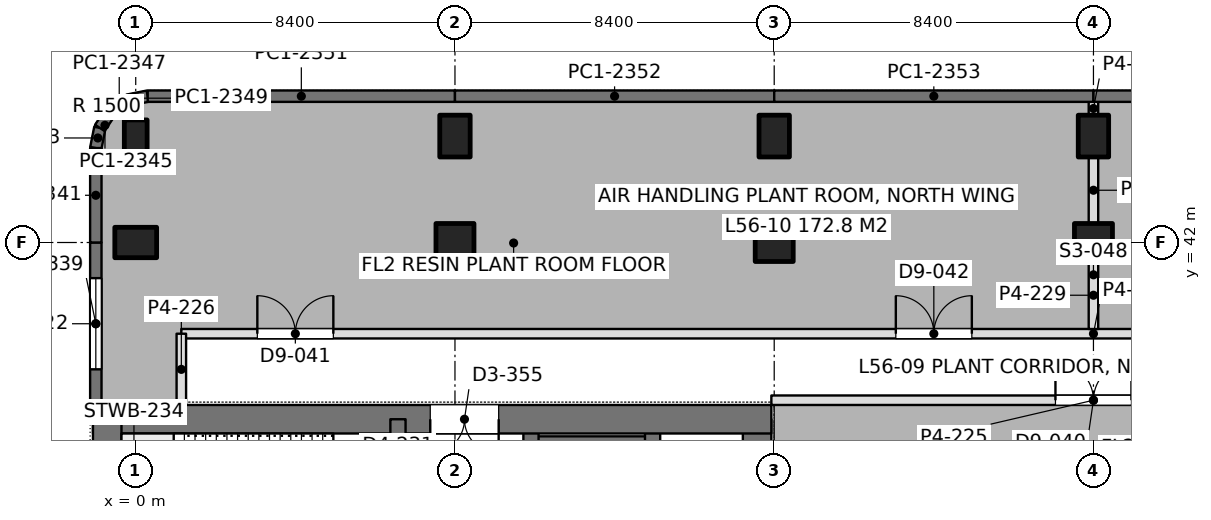
"""IFC4 building model, lengths in metres.
Left out: names, types, materials, properties, quantities, classifications, styles, units other than length and angle.
Written with IfcOpenShell. Run it as: python <this file> out.ifc"""

import sys

from ifc_helpers import new_model, si_unit, direction, frame, frame_2d, origin, origin_2d, place, context, subcontext, project, spatial, rectangle, extrude, element, fill, save


model = new_model("IFC4")
c1 = context("Model", 3, precision=1e-05, world=origin(), true_north=direction((0.0, 1.0)))
c2 = subcontext(c1, "Body", "Model", "MODEL_VIEW")
j1 = project(units=[si_unit("LENGTHUNIT", "METRE"), si_unit("PLANEANGLEUNIT", "RADIAN")], contexts=[c1])
p1 = place(None, origin())
s1 = spatial("IfcSite", under=j1, at=p1, CompositionType="ELEMENT")
p2 = place(p1, origin())
s2 = spatial("IfcBuilding", under=s1, at=p2, CompositionType="ELEMENT")
p3 = place(p2, frame((0.0, 0.0, 244.8)))
s3 = spatial("IfcBuildingStorey", under=s2, at=p3, CompositionType="ELEMENT", Elevation=244.8)
p4 = place(p3, frame((0.0, 42.0, 0.0), z_axis=(0.0, 0.0, 1.0), x_axis=(0.0, 1.0, 0.0)))
e1 = element("IfcColumn", 1, at=p4, inside=s3, PredefinedType="COLUMN", context=c2, shape_type="SweptSolid", body=[
    extrude(rectangle(XDim=0.8, YDim=1.1, at=origin_2d()), origin(), (0.0, 0.0, 1.0), 5.4),
])
p5 = place(p3, frame((0.0, 44.8, 0.0), z_axis=(0.0, 0.0, 1.0), x_axis=(1.0, 0.0, 0.0)))
e2 = element("IfcColumn", 2, at=p5, inside=s3, PredefinedType="COLUMN", context=c2, shape_type="SweptSolid", body=[
    extrude(rectangle(XDim=0.6, YDim=0.85, at=origin_2d()), origin(), (0.0, 0.0, 1.0), 5.4),
])
p6 = place(p3, frame((8.4, 42.0, 0.0), z_axis=(0.0, 0.0, 1.0), x_axis=(1.0, 0.0, 0.0)))
e3 = element("IfcColumn", 3, at=p6, inside=s3, PredefinedType="COLUMN", context=c2, shape_type="SweptSolid", body=[
    extrude(rectangle(XDim=1.0, YDim=1.0, at=origin_2d()), origin(), (0.0, 0.0, 1.0), 5.4),
])
p7 = place(p3, frame((8.4, 44.8, 0.0), z_axis=(0.0, 0.0, 1.0), x_axis=(1.0, 0.0, 0.0)))
e4 = element("IfcColumn", 4, at=p7, inside=s3, PredefinedType="COLUMN", context=c2, shape_type="SweptSolid", body=[
    extrude(rectangle(XDim=0.8, YDim=1.1, at=origin_2d()), origin(), (0.0, 0.0, 1.0), 5.4),
])
p8 = place(p3, frame((16.8, 42.0, 0.0), z_axis=(0.0, 0.0, 1.0), x_axis=(1.0, 0.0, 0.0)))
e5 = element("IfcColumn", 5, at=p8, inside=s3, PredefinedType="COLUMN", context=c2, shape_type="SweptSolid", body=[
    extrude(rectangle(XDim=1.0, YDim=1.0, at=origin_2d()), origin(), (0.0, 0.0, 1.0), 5.4),
])
p9 = place(p3, frame((16.8, 44.8, 0.0), z_axis=(0.0, 0.0, 1.0), x_axis=(1.0, 0.0, 0.0)))
e6 = element("IfcColumn", 6, at=p9, inside=s3, PredefinedType="COLUMN", context=c2, shape_type="SweptSolid", body=[
    extrude(rectangle(XDim=0.8, YDim=1.1, at=origin_2d()), origin(), (0.0, 0.0, 1.0), 5.4),
])
p10 = place(p3, frame((25.2, 42.0, 0.0), z_axis=(0.0, 0.0, 1.0), x_axis=(1.0, 0.0, 0.0)))
e7 = element("IfcColumn", 7, at=p10, inside=s3, PredefinedType="COLUMN", context=c2, shape_type="SweptSolid", body=[
    extrude(rectangle(XDim=1.0, YDim=1.0, at=origin_2d()), origin(), (0.0, 0.0, 1.0), 5.4),
])
p11 = place(p3, frame((25.2, 44.8, 0.0), z_axis=(0.0, 0.0, 1.0), x_axis=(1.0, 0.0, 0.0)))
e8 = element("IfcColumn", 8, at=p11, inside=s3, PredefinedType="COLUMN", context=c2, shape_type="SweptSolid", body=[
    extrude(rectangle(XDim=0.8, YDim=1.1, at=origin_2d()), origin(), (0.0, 0.0, 1.0), 5.4),
])
p12 = place(p3, frame((-1.125, 37.35, 0.0), z_axis=(0.0, 0.0, 1.0), x_axis=(1.0, 0.0, 0.0)))
e9 = element("IfcWall", 9, at=p12, inside=s3, PredefinedType="SHEAR", context=c2, shape_type="SweptSolid", body=[
    extrude(rectangle(XDim=17.85, YDim=0.75, at=frame_2d((8.925, 0.0))), origin(), (0.0, 0.0, 1.0), 5.4),
])
p13 = place(p12, frame((8.875, 0.0, 0.0)))
e10 = element("IfcOpeningElement", 10, at=p13, cuts=e9, PredefinedType="OPENING", context=c2, shape_type="SweptSolid", body=[
    extrude(rectangle(XDim=1.8, YDim=2.4, at=frame_2d((0.9, 1.2))), frame((0.0, 0.385, 0.0), z_axis=(0.0, -1.0, 0.0), x_axis=(1.0, 0.0, 0.0)), (0.0, 0.0, 1.0), 0.77),
])
p14 = place(p3, frame((-0.75, 13.05, 0.0), z_axis=(0.0, 0.0, 1.0), x_axis=(0.0, 1.0, 0.0)))
e11 = element("IfcWall", 11, at=p14, inside=s3, PredefinedType="SHEAR", context=c2, shape_type="SweptSolid", body=[
    extrude(rectangle(XDim=24.3, YDim=0.75, at=frame_2d((12.15, 0.0))), origin(), (0.0, 0.0, 1.0), 5.4),
])
p15 = place(p3, frame((16.35, 27.8, 0.0), z_axis=(0.0, 0.0, 1.0), x_axis=(0.0, 1.0, 0.0)))
e12 = element("IfcWall", 12, at=p15, inside=s3, PredefinedType="SHEAR", context=c2, shape_type="SweptSolid", body=[
    extrude(rectangle(XDim=9.55, YDim=0.75, at=frame_2d((4.775, 0.0))), origin(), (0.0, 0.0, 1.0), 5.4),
])
p16 = place(p3, frame((6.9, 13.05, 0.0), z_axis=(0.0, 0.0, 1.0), x_axis=(0.0, 1.0, 0.0)))
e13 = element("IfcWall", 13, at=p16, inside=s3, PredefinedType="SHEAR", context=c2, shape_type="SweptSolid", body=[
    extrude(rectangle(XDim=24.3, YDim=0.4, at=frame_2d((12.15, 0.0))), origin(), (0.0, 0.0, 1.0), 5.4),
])
p17 = place(p16, frame((1.3, 0.0, 0.0)))
e14 = element("IfcOpeningElement", 14, at=p17, cuts=e13, PredefinedType="OPENING", context=c2, shape_type="SweptSolid", body=[
    extrude(rectangle(XDim=1.0, YDim=2.2, at=frame_2d((0.5, 1.1))), frame((0.0, 0.21, 0.0), z_axis=(0.0, -1.0, 0.0), x_axis=(1.0, 0.0, 0.0)), (0.0, 0.0, 1.0), 0.42),
])
p18 = place(p16, frame((22.0, 0.0, 0.0)))
e15 = element("IfcOpeningElement", 15, at=p18, cuts=e13, PredefinedType="OPENING", context=c2, shape_type="SweptSolid", body=[
    extrude(rectangle(XDim=1.0, YDim=2.2, at=frame_2d((0.5, 1.1))), frame((0.0, 0.21, 0.0), z_axis=(0.0, -1.0, 0.0), x_axis=(1.0, 0.0, 0.0)), (0.0, 0.0, 1.0), 0.42),
])
p19 = place(p16, frame((5.55, 0.0, 0.0)))
e16 = element("IfcOpeningElement", 16, at=p19, cuts=e13, PredefinedType="OPENING", context=c2, shape_type="SweptSolid", body=[
    extrude(rectangle(XDim=1.0, YDim=2.2, at=frame_2d((0.5, 1.1))), frame((0.0, 0.21, 0.0), z_axis=(0.0, -1.0, 0.0), x_axis=(1.0, 0.0, 0.0)), (0.0, 0.0, 1.0), 0.42),
])
p20 = place(p16, frame((9.55, 0.0, 0.0)))
e17 = element("IfcOpeningElement", 17, at=p20, cuts=e13, PredefinedType="OPENING", context=c2, shape_type="SweptSolid", body=[
    extrude(rectangle(XDim=1.0, YDim=2.2, at=frame_2d((0.5, 1.1))), frame((0.0, 0.21, 0.0), z_axis=(0.0, -1.0, 0.0), x_axis=(1.0, 0.0, 0.0)), (0.0, 0.0, 1.0), 0.42),
])
p21 = place(p16, frame((12.8, 0.0, 0.0)))
e18 = element("IfcOpeningElement", 18, at=p21, cuts=e13, PredefinedType="OPENING", context=c2, shape_type="SweptSolid", body=[
    extrude(rectangle(XDim=1.1, YDim=2.2, at=frame_2d((0.55, 1.1))), frame((0.0, 0.21, 0.0), z_axis=(0.0, -1.0, 0.0), x_axis=(1.0, 0.0, 0.0)), (0.0, 0.0, 1.0), 0.42),
])
p22 = place(p16, frame((15.538, 0.0, 0.0)))
e19 = element("IfcOpeningElement", 19, at=p22, cuts=e13, PredefinedType="OPENING", context=c2, shape_type="SweptSolid", body=[
    extrude(rectangle(XDim=1.1, YDim=2.2, at=frame_2d((0.55, 1.1))), frame((0.0, 0.21, 0.0), z_axis=(0.0, -1.0, 0.0), x_axis=(1.0, 0.0, 0.0)), (0.0, 0.0, 1.0), 0.42),
])
p23 = place(p16, frame((18.262, 0.0, 0.0)))
e20 = element("IfcOpeningElement", 20, at=p23, cuts=e13, PredefinedType="OPENING", context=c2, shape_type="SweptSolid", body=[
    extrude(rectangle(XDim=1.1, YDim=2.2, at=frame_2d((0.55, 1.1))), frame((0.0, 0.21, 0.0), z_axis=(0.0, -1.0, 0.0), x_axis=(1.0, 0.0, 0.0)), (0.0, 0.0, 1.0), 0.42),
])
p24 = place(p3, frame((10.4, 13.05, 0.0), z_axis=(0.0, 0.0, 1.0), x_axis=(0.0, 1.0, 0.0)))
e21 = element("IfcWall", 21, at=p24, inside=s3, PredefinedType="SHEAR", context=c2, shape_type="SweptSolid", body=[
    extrude(rectangle(XDim=24.3, YDim=0.4, at=frame_2d((12.15, 0.0))), origin(), (0.0, 0.0, 1.0), 5.4),
])
p25 = place(p24, frame((15.75, 0.0, 0.0)))
e22 = element("IfcOpeningElement", 22, at=p25, cuts=e21, PredefinedType="OPENING", context=c2, shape_type="SweptSolid", body=[
    extrude(rectangle(XDim=1.1, YDim=2.2, at=frame_2d((0.55, 1.1))), frame((0.0, 0.21, 0.0), z_axis=(0.0, -1.0, 0.0), x_axis=(1.0, 0.0, 0.0)), (0.0, 0.0, 1.0), 0.42),
])
p26 = place(p24, frame((18.6, 0.0, 0.0)))
e23 = element("IfcOpeningElement", 23, at=p26, cuts=e21, PredefinedType="OPENING", context=c2, shape_type="SweptSolid", body=[
    extrude(rectangle(XDim=1.1, YDim=2.2, at=frame_2d((0.55, 1.1))), frame((0.0, 0.21, 0.0), z_axis=(0.0, -1.0, 0.0), x_axis=(1.0, 0.0, 0.0)), (0.0, 0.0, 1.0), 0.42),
])
p27 = place(p24, frame((21.45, 0.0, 0.0)))
e24 = element("IfcOpeningElement", 24, at=p27, cuts=e21, PredefinedType="OPENING", context=c2, shape_type="SweptSolid", body=[
    extrude(rectangle(XDim=1.1, YDim=2.2, at=frame_2d((0.55, 1.1))), frame((0.0, 0.21, 0.0), z_axis=(0.0, -1.0, 0.0), x_axis=(1.0, 0.0, 0.0)), (0.0, 0.0, 1.0), 0.42),
])
p28 = place(p24, frame((8.65, 0.0, 0.0)))
e25 = element("IfcOpeningElement", 25, at=p28, cuts=e21, PredefinedType="OPENING", context=c2, shape_type="SweptSolid", body=[
    extrude(rectangle(XDim=1.8, YDim=2.4, at=frame_2d((0.9, 1.2))), frame((0.0, 0.21, 0.0), z_axis=(0.0, -1.0, 0.0), x_axis=(1.0, 0.0, 0.0)), (0.0, 0.0, 1.0), 0.42),
])
p29 = place(p24, frame((1.05, 0.0, 0.0)))
e26 = element("IfcOpeningElement", 26, at=p29, cuts=e21, PredefinedType="OPENING", context=c2, shape_type="SweptSolid", body=[
    extrude(rectangle(XDim=1.8, YDim=2.4, at=frame_2d((0.9, 1.2))), frame((0.0, 0.21, 0.0), z_axis=(0.0, -1.0, 0.0), x_axis=(1.0, 0.0, 0.0)), (0.0, 0.0, 1.0), 0.42),
])
p30 = place(p3, frame((13.6, 27.925, 0.0), z_axis=(0.0, 0.0, 1.0), x_axis=(0.0, 1.0, 0.0)))
e27 = element("IfcWall", 27, at=p30, inside=s3, PredefinedType="SHEAR", context=c2, shape_type="SweptSolid", body=[
    extrude(rectangle(XDim=9.425, YDim=0.4, at=frame_2d((4.712, 0.0))), origin(), (0.0, 0.0, 1.0), 5.4),
])
p31 = place(p3, frame((10.4, 36.625, 0.0), z_axis=(0.0, 0.0, 1.0), x_axis=(1.0, 0.0, 0.0)))
e28 = element("IfcWall", 28, at=p31, inside=s3, PredefinedType="SHEAR", context=c2, shape_type="SweptSolid", body=[
    extrude(rectangle(XDim=3.2, YDim=0.55, at=frame_2d((1.6, 0.0))), origin(), (0.0, 0.0, 1.0), 5.4),
])
p32 = place(p3, frame((-1.05, 37.725, 0.0), z_axis=(0.0, 0.0, 1.0), x_axis=(0.0, 1.0, 0.0)))
e29 = element("IfcWall", 29, at=p32, inside=s3, PredefinedType="SOLIDWALL", context=c2, shape_type="SweptSolid", body=[
    extrude(rectangle(XDim=4.275, YDim=0.3, at=frame_2d((2.137, 0.0))), origin(), (0.0, 0.0, 1.0), 5.25),
])
p33 = place(p32, frame((0.938, 0.0, 1.2)))
e30 = element("IfcOpeningElement", 30, at=p33, cuts=e29, PredefinedType="OPENING", context=c2, shape_type="SweptSolid", body=[
    extrude(rectangle(XDim=2.4, YDim=2.4, at=frame_2d((1.2, 1.2))), frame((0.0, 0.16, 0.0), z_axis=(0.0, -1.0, 0.0), x_axis=(1.0, 0.0, 0.0)), (0.0, 0.0, 1.0), 0.32),
])
p34 = place(p3, frame((-1.05, 42.0, 0.0), z_axis=(0.0, 0.0, 1.0), x_axis=(0.0, 1.0, 0.0)))
e31 = element("IfcWall", 31, at=p34, inside=s3, PredefinedType="SOLIDWALL", context=c2, shape_type="SweptSolid", body=[
    extrude(rectangle(XDim=2.485, YDim=0.3, at=frame_2d((1.243, 0.0))), origin(), (0.0, 0.0, 1.0), 5.25),
])
p35 = place(p3, frame((-1.05, 44.485, 0.0), z_axis=(0.0, 0.0, 1.0), x_axis=(0.195073962632, 0.980788534345, 0.0)))
e32 = element("IfcWall", 32, at=p35, inside=s3, PredefinedType="SOLIDWALL", context=c2, shape_type="SweptSolid", body=[
    extrude(rectangle(XDim=0.541, YDim=0.3, at=frame_2d((0.271, 0.0))), origin(), (0.0, 0.0, 1.0), 5.25),
])
p36 = place(p3, frame((-0.945, 45.015, 0.0), z_axis=(0.0, 0.0, 1.0), x_axis=(0.55534295404, 0.831621430339, 0.0)))
e33 = element("IfcWall", 33, at=p36, inside=s3, PredefinedType="SOLIDWALL", context=c2, shape_type="SweptSolid", body=[
    extrude(rectangle(XDim=0.526, YDim=0.3, at=frame_2d((0.263, 0.0))), origin(), (0.0, 0.0, 1.0), 5.25),
])
p37 = place(p3, frame((-0.653, 45.453, 0.0), z_axis=(0.0, 0.0, 1.0), x_axis=(0.831692711774, 0.555236195849, 0.0)))
e34 = element("IfcWall", 34, at=p37, inside=s3, PredefinedType="SOLIDWALL", context=c2, shape_type="SweptSolid", body=[
    extrude(rectangle(XDim=0.525, YDim=0.3, at=frame_2d((0.263, 0.0))), origin(), (0.0, 0.0, 1.0), 5.25),
])
p38 = place(p3, frame((-0.216, 45.744, 0.0), z_axis=(0.0, 0.0, 1.0), x_axis=(0.980702050465, 0.1955082817, 0.0)))
e35 = element("IfcWall", 35, at=p38, inside=s3, PredefinedType="SOLIDWALL", context=c2, shape_type="SweptSolid", body=[
    extrude(rectangle(XDim=0.541, YDim=0.3, at=frame_2d((0.271, 0.0))), origin(), (0.0, 0.0, 1.0), 5.25),
])
p39 = place(p3, frame((0.315, 45.85, 0.0), z_axis=(0.0, 0.0, 1.0), x_axis=(1.0, 0.0, 0.0)))
e36 = element("IfcWall", 36, at=p39, inside=s3, PredefinedType="SOLIDWALL", context=c2, shape_type="SweptSolid", body=[
    extrude(rectangle(XDim=8.085, YDim=0.3, at=frame_2d((4.042, 0.0))), origin(), (0.0, 0.0, 1.0), 5.25),
])
p40 = place(p3, frame((8.4, 45.85, 0.0), z_axis=(0.0, 0.0, 1.0), x_axis=(1.0, 0.0, 0.0)))
e37 = element("IfcWall", 37, at=p40, inside=s3, PredefinedType="SOLIDWALL", context=c2, shape_type="SweptSolid", body=[
    extrude(rectangle(XDim=8.4, YDim=0.3, at=frame_2d((4.2, 0.0))), origin(), (0.0, 0.0, 1.0), 5.25),
])
p41 = place(p3, frame((16.8, 45.85, 0.0), z_axis=(0.0, 0.0, 1.0), x_axis=(1.0, 0.0, 0.0)))
e38 = element("IfcWall", 38, at=p41, inside=s3, PredefinedType="SOLIDWALL", context=c2, shape_type="SweptSolid", body=[
    extrude(rectangle(XDim=8.4, YDim=0.3, at=frame_2d((4.2, 0.0))), origin(), (0.0, 0.0, 1.0), 5.25),
])
p42 = place(p3, frame((25.2, 45.85, 0.0), z_axis=(0.0, 0.0, 1.0), x_axis=(1.0, 0.0, 0.0)))
e39 = element("IfcWall", 39, at=p42, inside=s3, PredefinedType="SOLIDWALL", context=c2, shape_type="SweptSolid", body=[
    extrude(rectangle(XDim=8.4, YDim=0.3, at=frame_2d((4.2, 0.0))), origin(), (0.0, 0.0, 1.0), 5.25),
])
p43 = place(p3, frame((1.2, 39.6, 0.0), z_axis=(0.0, 0.0, 1.0), x_axis=(1.0, 0.0, 0.0)))
e40 = element("IfcWall", 40, at=p43, inside=s3, PredefinedType="PARTITIONING", context=c2, shape_type="SweptSolid", body=[
    extrude(rectangle(XDim=48.0, YDim=0.25, at=frame_2d((24.0, 0.0))), origin(), (0.0, 0.0, 1.0), 4.7),
])
p44 = place(p43, frame((2.0, 0.0, 0.0)))
e41 = element("IfcOpeningElement", 41, at=p44, cuts=e40, PredefinedType="OPENING", context=c2, shape_type="SweptSolid", body=[
    extrude(rectangle(XDim=2.0, YDim=2.4, at=frame_2d((1.0, 1.2))), frame((0.0, 0.135, 0.0), z_axis=(0.0, -1.0, 0.0), x_axis=(1.0, 0.0, 0.0)), (0.0, 0.0, 1.0), 0.27),
])
p45 = place(p43, frame((18.8, 0.0, 0.0)))
e42 = element("IfcOpeningElement", 42, at=p45, cuts=e40, PredefinedType="OPENING", context=c2, shape_type="SweptSolid", body=[
    extrude(rectangle(XDim=2.0, YDim=2.4, at=frame_2d((1.0, 1.2))), frame((0.0, 0.135, 0.0), z_axis=(0.0, -1.0, 0.0), x_axis=(1.0, 0.0, 0.0)), (0.0, 0.0, 1.0), 0.27),
])
p46 = place(p43, frame((27.2, 0.0, 0.0)))
e43 = element("IfcOpeningElement", 43, at=p46, cuts=e40, PredefinedType="OPENING", context=c2, shape_type="SweptSolid", body=[
    extrude(rectangle(XDim=2.0, YDim=2.4, at=frame_2d((1.0, 1.2))), frame((0.0, 0.135, 0.0), z_axis=(0.0, -1.0, 0.0), x_axis=(1.0, 0.0, 0.0)), (0.0, 0.0, 1.0), 0.27),
])
p47 = place(p43, frame((44.0, 0.0, 0.0)))
e44 = element("IfcOpeningElement", 44, at=p47, cuts=e40, PredefinedType="OPENING", context=c2, shape_type="SweptSolid", body=[
    extrude(rectangle(XDim=2.0, YDim=2.4, at=frame_2d((1.0, 1.2))), frame((0.0, 0.135, 0.0), z_axis=(0.0, -1.0, 0.0), x_axis=(1.0, 0.0, 0.0)), (0.0, 0.0, 1.0), 0.27),
])
p48 = place(p3, frame((1.2, 37.724, 0.0), z_axis=(0.0, 0.0, 1.0), x_axis=(0.0, 1.0, 0.0)))
e45 = element("IfcWall", 45, at=p48, inside=s3, PredefinedType="PARTITIONING", context=c2, shape_type="SweptSolid", body=[
    extrude(rectangle(XDim=1.876, YDim=0.25, at=frame_2d((0.938, 0.0))), origin(), (0.0, 0.0, 1.0), 5.25),
])
p49 = place(p3, frame((25.2, 39.724, 0.0), z_axis=(0.0, 0.0, 1.0), x_axis=(0.0, 1.0, 0.0)))
e46 = element("IfcWall", 46, at=p49, inside=s3, PredefinedType="PARTITIONING", context=c2, shape_type="SweptSolid", body=[
    extrude(rectangle(XDim=1.777, YDim=0.25, at=frame_2d((0.888, 0.0))), origin(), (0.0, 0.0, 1.0), 4.7),
])
p50 = place(p3, frame((25.2, 42.499, 0.0), z_axis=(0.0, 0.0, 1.0), x_axis=(0.0, 1.0, 0.0)))
e47 = element("IfcWall", 47, at=p50, inside=s3, PredefinedType="PARTITIONING", context=c2, shape_type="SweptSolid", body=[
    extrude(rectangle(XDim=1.752, YDim=0.25, at=frame_2d((0.876, 0.0))), origin(), (0.0, 0.0, 1.0), 4.89),
])
p51 = place(p3, frame((25.2, 45.351, 0.0), z_axis=(0.0, 0.0, 1.0), x_axis=(0.0, 1.0, 0.0)))
e48 = element("IfcWall", 48, at=p51, inside=s3, PredefinedType="PARTITIONING", context=c2, shape_type="SweptSolid", body=[
    extrude(rectangle(XDim=0.351, YDim=0.25, at=frame_2d((0.175, 0.0))), origin(), (0.0, 0.0, 1.0), 5.25),
])
p52 = place(p3, frame((16.725, 37.85, 0.0), z_axis=(0.0, 0.0, 1.0), x_axis=(1.0, 0.0, 0.0)))
e49 = element("IfcWall", 49, at=p52, inside=s3, PredefinedType="PARTITIONING", context=c2, shape_type="SweptSolid", body=[
    extrude(rectangle(XDim=16.95, YDim=0.25, at=frame_2d((8.475, 0.0))), origin(), (0.0, 0.0, 1.0), 4.7),
])
p53 = place(p52, frame((7.475, 0.0, 0.0)))
e50 = element("IfcOpeningElement", 50, at=p53, cuts=e49, PredefinedType="OPENING", context=c2, shape_type="SweptSolid", body=[
    extrude(rectangle(XDim=2.0, YDim=2.4, at=frame_2d((1.0, 1.2))), frame((0.0, 0.135, 0.0), z_axis=(0.0, -1.0, 0.0), x_axis=(1.0, 0.0, 0.0)), (0.0, 0.0, 1.0), 0.27),
])
p54 = place(p33, origin())
e51 = element("IfcWindow", 51, at=p54, inside=s3, PartitioningType="SINGLE_PANEL", PredefinedType="USERDEFINED", context=c2, shape_type="SweptSolid", body=[
    extrude(rectangle(XDim=2.4, YDim=2.4, at=frame_2d((1.2, 1.2))), frame((0.0, 0.03, 0.0), z_axis=(0.0, -1.0, 0.0), x_axis=(1.0, 0.0, 0.0)), (0.0, 0.0, 1.0), 0.06),
])
fill(e30, e51)
p55 = place(p13, frame((1.8, 0.0, 0.0), z_axis=(0.0, 0.0, 1.0), x_axis=(-1.0, 0.0, 0.0)))
e52 = element("IfcDoor", 52, at=p55, inside=s3, OperationType="DOUBLE_DOOR_SINGLE_SWING", PredefinedType="DOOR", context=c2, shape_type="SweptSolid", body=[
    extrude(rectangle(XDim=1.8, YDim=2.4, at=frame_2d((0.9, 1.2))), frame((0.0, 0.025, 0.0), z_axis=(0.0, -1.0, 0.0), x_axis=(1.0, 0.0, 0.0)), (0.0, 0.0, 1.0), 0.05),
])
fill(e10, e52)
p56 = place(p44, origin())
e53 = element("IfcDoor", 53, at=p56, inside=s3, OperationType="DOUBLE_DOOR_SINGLE_SWING", PredefinedType="DOOR", context=c2, shape_type="SweptSolid", body=[
    extrude(rectangle(XDim=2.0, YDim=2.4, at=frame_2d((1.0, 1.2))), frame((0.0, 0.025, 0.0), z_axis=(0.0, -1.0, 0.0), x_axis=(1.0, 0.0, 0.0)), (0.0, 0.0, 1.0), 0.05),
])
fill(e41, e53)
p57 = place(p45, origin())
e54 = element("IfcDoor", 54, at=p57, inside=s3, OperationType="DOUBLE_DOOR_SINGLE_SWING", PredefinedType="DOOR", context=c2, shape_type="SweptSolid", body=[
    extrude(rectangle(XDim=2.0, YDim=2.4, at=frame_2d((1.0, 1.2))), frame((0.0, 0.025, 0.0), z_axis=(0.0, -1.0, 0.0), x_axis=(1.0, 0.0, 0.0)), (0.0, 0.0, 1.0), 0.05),
])
fill(e42, e54)
p58 = place(p53, origin())
e55 = element("IfcDoor", 55, at=p58, inside=s3, OperationType="DOUBLE_DOOR_SINGLE_SWING", PredefinedType="DOOR", context=c2, shape_type="SweptSolid", body=[
    extrude(rectangle(XDim=2.0, YDim=2.4, at=frame_2d((1.0, 1.2))), frame((0.0, 0.025, 0.0), z_axis=(0.0, -1.0, 0.0), x_axis=(1.0, 0.0, 0.0)), (0.0, 0.0, 1.0), 0.05),
])
fill(e50, e55)
save(model, sys.argv[1])
